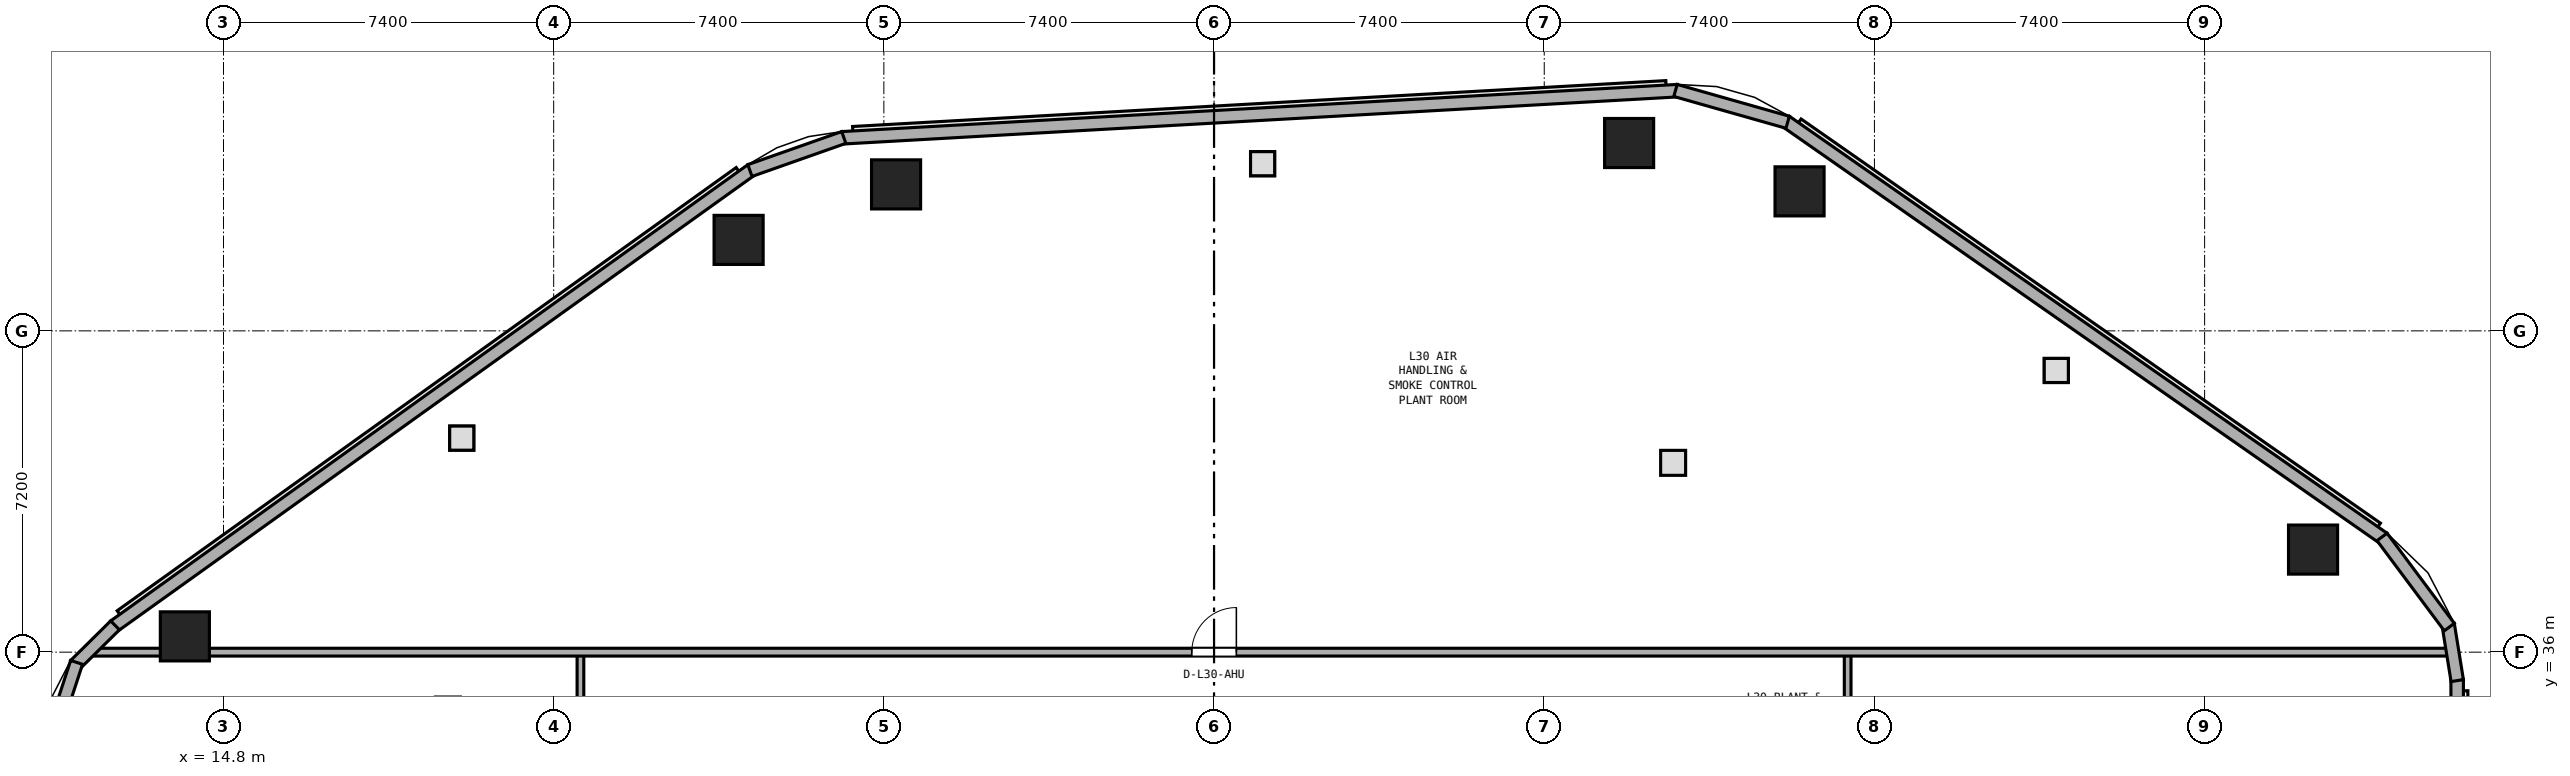
"""IFC4 building model, lengths in metres.
Left out: names, types, materials, properties, quantities, classifications, styles, units other than length and angle.
Written with IfcOpenShell. Run it as: python <this file> out.ifc"""

import sys

from ifc_helpers import new_model, si_unit, direction, frame, frame_2d, origin, origin_2d, place, context, subcontext, project, spatial, rectangle, extrude, element, fill, save


model = new_model("IFC4")
c1 = context("Model", 3, precision=1e-05, world=origin(), true_north=direction((0.0, 1.0)))
c2 = subcontext(c1, "Body", "Model", "MODEL_VIEW")
j1 = project(units=[si_unit("LENGTHUNIT", "METRE"), si_unit("PLANEANGLEUNIT", "RADIAN")], contexts=[c1])
p1 = place(None, origin())
s1 = spatial("IfcSite", under=j1, at=p1, CompositionType="ELEMENT")
p2 = place(p1, origin())
s2 = spatial("IfcBuilding", under=s1, at=p2, CompositionType="ELEMENT")
p3 = place(p2, frame((0.0, 0.0, 120.0)))
s3 = spatial("IfcBuildingStorey", under=s2, at=p3, CompositionType="ELEMENT", Elevation=120.0)
for number, where, z_axis, x_axis in (
    (1, (61.63, 38.299, 0.0), (0.0, 0.0, 1.0), (1.0, 0.0, 0.0)),
    (2, (50.122, 46.326, 0.0), (0.0, 0.0, 1.0), (1.0, 0.0, 0.0)),
    (3, (46.302, 47.409, 0.0), (0.0, 0.0, 1.0), (1.0, 0.0, 0.0)),
    (4, (29.874, 46.482, 0.0), (0.0, 0.0, 1.0), (1.0, 0.0, 0.0)),
    (5, (26.344, 45.238, 0.0), (0.0, 0.0, 1.0), (1.0, 0.0, 0.0)),
    (6, (13.934, 36.354, 0.0), (0.0, 0.0, 1.0), (1.0, 0.0, 0.0)),
):
    element("IfcColumn", number, at=place(p3, frame(where, z_axis=z_axis, x_axis=x_axis)), inside=s3, PredefinedType="COLUMN", context=c2, shape_type="SweptSolid", body=[
        extrude(rectangle(XDim=1.1, YDim=1.1, at=origin_2d()), origin(), (0.0, 0.0, 1.0), 5.0),
    ])
p4 = place(p3, frame((51.2, 14.4, 0.0), z_axis=(0.0, 0.0, 1.0), x_axis=(0.0, 1.0, 0.0)))
e7 = element("IfcWall", 7, at=p4, inside=s3, PredefinedType="PARTITIONING", context=c2, shape_type="SweptSolid", body=[
    extrude(rectangle(XDim=21.6, YDim=0.15, at=frame_2d((10.8, 0.0))), origin(), (0.0, 0.0, 1.0), 4.6),
])
p5 = place(p4, frame((10.2, 0.0, 0.0)))
e8 = element("IfcOpeningElement", 8, at=p5, cuts=e7, PredefinedType="OPENING", context=c2, shape_type="SweptSolid", body=[
    extrude(rectangle(XDim=1.2, YDim=2.15, at=frame_2d((0.6, 1.075))), frame((0.0, 0.085, 0.0), z_axis=(0.0, -1.0, 0.0), x_axis=(1.0, 0.0, 0.0)), (0.0, 0.0, 1.0), 0.17),
])
p6 = place(p3, frame((22.8, 14.4, 0.0), z_axis=(0.0, 0.0, 1.0), x_axis=(0.0, 1.0, 0.0)))
e9 = element("IfcWall", 9, at=p6, inside=s3, PredefinedType="PARTITIONING", context=c2, shape_type="SweptSolid", body=[
    extrude(rectangle(XDim=21.6, YDim=0.15, at=frame_2d((10.8, 0.0))), origin(), (0.0, 0.0, 1.0), 4.6),
])
p7 = place(p6, frame((10.3, 0.0, 0.0)))
e10 = element("IfcOpeningElement", 10, at=p7, cuts=e9, PredefinedType="OPENING", context=c2, shape_type="SweptSolid", body=[
    extrude(rectangle(XDim=1.0, YDim=2.04, at=frame_2d((0.5, 1.02))), frame((0.0, 0.085, 0.0), z_axis=(0.0, -1.0, 0.0), x_axis=(1.0, 0.0, 0.0)), (0.0, 0.0, 1.0), 0.17),
])
p8 = place(p3, frame((11.703, 36.0, 0.0), z_axis=(0.0, 0.0, 1.0), x_axis=(1.0, 0.0, 0.0)))
e11 = element("IfcWall", 11, at=p8, inside=s3, PredefinedType="PARTITIONING", context=c2, shape_type="SweptSolid", body=[
    extrude(rectangle(XDim=52.993, YDim=0.175, at=frame_2d((26.497, 0.0))), origin(), (0.0, 0.0, 1.0), 2.2),
])
p9 = place(p8, frame((24.797, 0.0, 0.0)))
e12 = element("IfcOpeningElement", 12, at=p9, cuts=e11, PredefinedType="OPENING", context=c2, shape_type="SweptSolid", body=[
    extrude(rectangle(XDim=1.0, YDim=2.04, at=frame_2d((0.5, 1.02))), frame((0.0, 0.097, 0.0), z_axis=(0.0, -1.0, 0.0), x_axis=(1.0, 0.0, 0.0)), (0.0, 0.0, 1.0), 0.195),
])
p10 = place(p3, frame((64.86, 16.29, 0.0), z_axis=(0.0, 0.0, 1.0), x_axis=(0.0, 1.0, 0.0)))
e13 = element("IfcWall", 13, at=p10, inside=s3, PredefinedType="STANDARD", context=c2, shape_type="SweptSolid", body=[
    extrude(rectangle(XDim=19.096, YDim=0.28, at=frame_2d((9.548, 0.0))), origin(), (0.0, 0.0, 1.0), 3.907),
])
p11 = place(p3, frame((63.208, 38.551, 0.0), z_axis=(0.0, 0.0, 1.0), x_axis=(-0.820177525249, 0.572109104172, 0.0)))
e14 = element("IfcWall", 14, at=p11, inside=s3, PredefinedType="STANDARD", context=c2, shape_type="SweptSolid", body=[
    extrude(rectangle(XDim=16.331, YDim=0.28, at=frame_2d((8.166, 0.0))), origin(), (0.0, 0.0, 1.0), 4.6),
])
p12 = place(p3, frame((47.388, 48.582, 0.0), z_axis=(0.0, 0.0, 1.0), x_axis=(-0.99841158726, -0.056340948024, 0.0)))
e15 = element("IfcWall", 15, at=p12, inside=s3, PredefinedType="STANDARD", context=c2, shape_type="SweptSolid", body=[
    extrude(rectangle(XDim=18.754, YDim=0.28, at=frame_2d((9.377, 0.0))), origin(), (0.0, 0.0, 1.0), 4.6),
])
p13 = place(p3, frame((26.634, 46.81, 0.0), z_axis=(0.0, 0.0, 1.0), x_axis=(-0.813113097485, -0.582105738417, 0.0)))
e16 = element("IfcWall", 16, at=p13, inside=s3, PredefinedType="STANDARD", context=c2, shape_type="SweptSolid", body=[
    extrude(rectangle(XDim=17.563, YDim=0.28, at=frame_2d((8.781, 0.0))), origin(), (0.0, 0.0, 1.0), 4.6),
])
p14 = place(p3, frame((64.862, 35.363, 0.0), z_axis=(0.0, 0.0, 1.0), x_axis=(-0.159653222715, 0.98717316033, 0.0)))
e17 = element("IfcWall", 17, at=p14, inside=s3, PredefinedType="STANDARD", context=c2, shape_type="SweptSolid", body=[
    extrude(rectangle(XDim=1.277, YDim=0.28, at=frame_2d((0.638, 0.0))), origin(), (0.0, 0.0, 1.0), 4.6),
])
p15 = place(p3, frame((64.684, 36.562, 0.0), z_axis=(0.0, 0.0, 1.0), x_axis=(-0.598123405715, 0.801404012677, 0.0)))
e18 = element("IfcWall", 18, at=p15, inside=s3, PredefinedType="STANDARD", context=c2, shape_type="SweptSolid", body=[
    extrude(rectangle(XDim=2.521, YDim=0.28, at=frame_2d((1.26, 0.0))), origin(), (0.0, 0.0, 1.0), 4.6),
])
p16 = place(p3, frame((49.855, 47.875, 0.0), z_axis=(0.0, 0.0, 1.0), x_axis=(-0.962058075469, 0.272844753338, 0.0)))
e19 = element("IfcWall", 19, at=p16, inside=s3, PredefinedType="STANDARD", context=c2, shape_type="SweptSolid", body=[
    extrude(rectangle(XDim=2.613, YDim=0.28, at=frame_2d((1.306, 0.0))), origin(), (0.0, 0.0, 1.0), 4.6),
])
p17 = place(p3, frame((28.702, 47.533, 0.0), z_axis=(0.0, 0.0, 1.0), x_axis=(-0.943147875264, -0.332373412571, 0.0)))
e20 = element("IfcWall", 20, at=p17, inside=s3, PredefinedType="STANDARD", context=c2, shape_type="SweptSolid", body=[
    extrude(rectangle(XDim=2.23, YDim=0.28, at=frame_2d((1.115, 0.0))), origin(), (0.0, 0.0, 1.0), 4.6),
])
p18 = place(p3, frame((12.37, 36.601, 0.0), z_axis=(0.0, 0.0, 1.0), x_axis=(-0.711257890723, -0.702931157998, 0.0)))
e21 = element("IfcWall", 21, at=p18, inside=s3, PredefinedType="STANDARD", context=c2, shape_type="SweptSolid", body=[
    extrude(rectangle(XDim=1.261, YDim=0.28, at=frame_2d((0.63, 0.0))), origin(), (0.0, 0.0, 1.0), 4.6),
])
p19 = place(p3, frame((11.508, 35.771, 0.0), z_axis=(0.0, 0.0, 1.0), x_axis=(-0.311193632475, -0.950346527908, 0.0)))
e22 = element("IfcWall", 22, at=p19, inside=s3, PredefinedType="STANDARD", context=c2, shape_type="SweptSolid", body=[
    extrude(rectangle(XDim=2.49, YDim=0.28, at=frame_2d((1.245, 0.0))), origin(), (0.0, 0.0, 1.0), 4.6),
])
p20 = place(p9, origin())
e23 = element("IfcDoor", 23, at=p20, inside=s3, OperationType="SINGLE_SWING_RIGHT", PredefinedType="DOOR", context=c2, shape_type="SweptSolid", body=[
    extrude(rectangle(XDim=1.0, YDim=2.04, at=frame_2d((0.5, 1.02))), frame((0.0, 0.025, 0.0), z_axis=(0.0, -1.0, 0.0), x_axis=(1.0, 0.0, 0.0)), (0.0, 0.0, 1.0), 0.05),
])
fill(e12, e23)
save(model, sys.argv[1])
